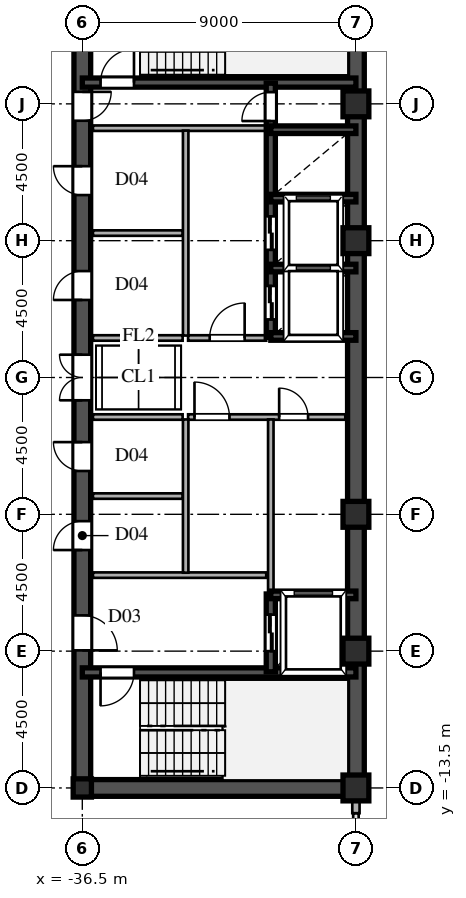
"""IFC4 building model, lengths in metres.
Left out: names, types, materials, properties, quantities, classifications, styles, units other than length and angle.
Written with IfcOpenShell. Run it as: python <this file> out.ifc"""

import sys

from ifc_helpers import new_model, si_unit, direction, frame, frame_2d, origin, origin_2d, place, context, subcontext, project, spatial, rectangle, hollow_rectangle, i_section, extrude, source, transform, mapped, element, fill, save


model = new_model("IFC4")
c1 = context("Model", 3, precision=1e-05, world=origin(), true_north=direction((0.0, 1.0)))
c2 = subcontext(c1, "Body", "Model", "MODEL_VIEW")
j1 = project(units=[si_unit("LENGTHUNIT", "METRE"), si_unit("PLANEANGLEUNIT", "RADIAN")], contexts=[c1])
p1 = place(None, origin())
s1 = spatial("IfcSite", under=j1, at=p1, CompositionType="ELEMENT")
p2 = place(p1, origin())
s2 = spatial("IfcBuilding", under=s1, at=p2, CompositionType="ELEMENT")
p3 = place(p2, frame((0.0, 0.0, 177.9)))
s3 = spatial("IfcBuildingStorey", under=s2, at=p3, CompositionType="ELEMENT", Elevation=177.9)
m1 = source(origin(), c2, "Body", "SweptSolid", [
    extrude(hollow_rectangle(XDim=0.85, YDim=0.85, WallThickness=0.036, at=origin_2d()), origin(), (0.0, 0.0, 1.0), 3.6),
])
for number, where, z_axis, x_axis in (
    (1, (-27.5, -13.5, 0.0), (0.0, 0.0, 1.0), (1.0, 0.0, 0.0)),
    (2, (-27.5, -9.0, 0.0), (0.0, 0.0, 1.0), (1.0, 0.0, 0.0)),
    (3, (-27.5, -4.5, 0.0), (0.0, 0.0, 1.0), (1.0, 0.0, 0.0)),
    (4, (-27.5, 4.5, 0.0), (0.0, 0.0, 1.0), (1.0, 0.0, 0.0)),
    (5, (-27.5, 9.0, 0.0), (0.0, 0.0, 1.0), (1.0, 0.0, 0.0)),
):
    element("IfcColumn", number, at=place(p3, frame(where, z_axis=z_axis, x_axis=x_axis)), inside=s3, PredefinedType="COLUMN", context=c2, shape_type="MappedRepresentation", body=[
        mapped(m1, transform((0.0, 0.0, 0.0), scale=1.0)),
    ])
m2 = source(origin(), c2, "Body", "SweptSolid", [
    extrude(i_section(OverallWidth=0.6, OverallDepth=0.6, WebThickness=0.025, FlangeThickness=0.04, at=origin_2d()), origin(), (0.0, 0.0, 1.0), 3.6),
])
p4 = place(p3, frame((-36.5, -13.5, 0.0), z_axis=(0.0, 0.0, 1.0), x_axis=(1.0, 0.0, 0.0)))
e6 = element("IfcColumn", 6, at=p4, inside=s3, PredefinedType="COLUMN", context=c2, shape_type="MappedRepresentation", body=[
    mapped(m2, transform((0.0, 0.0, 0.0), scale=1.0)),
])
p5 = place(p3, frame((-27.5, -14.33, 0.0), z_axis=(0.0, 0.0, 1.0), x_axis=(0.0, 1.0, 0.0)))
e7 = element("IfcWall", 7, at=p5, inside=s3, PredefinedType="SOLIDWALL", context=c2, shape_type="SweptSolid", body=[
    extrude(rectangle(XDim=0.55, YDim=0.24, at=frame_2d((0.275, 0.0))), origin(), (0.0, 0.0, 1.0), 2.88),
])
for number, where, z_axis, x_axis in (
    (8, (-27.5, -13.5, 0.0), (0.0, 0.0, 1.0), (0.0, 1.0, 0.0)),
    (9, (-27.5, 1.3, 0.0), (0.0, 0.0, 1.0), (0.0, 1.0, 0.0)),
):
    element("IfcWall", number, at=place(p3, frame(where, z_axis=z_axis, x_axis=x_axis)), inside=s3, PredefinedType="SHEAR", context=c2, shape_type="SweptSolid", body=[
        extrude(rectangle(XDim=12.2, YDim=0.55, at=frame_2d((6.1, 0.0))), origin(), (0.0, 0.0, 1.0), 3.38),
    ])
p6 = place(p3, frame((-27.5, -1.3, 0.0), z_axis=(0.0, 0.0, 1.0), x_axis=(0.0, 1.0, 0.0)))
e10 = element("IfcWall", 10, at=p6, inside=s3, PredefinedType="SHEAR", context=c2, shape_type="SweptSolid", body=[
    extrude(rectangle(XDim=2.6, YDim=0.55, at=frame_2d((1.3, 0.0))), origin(), (0.0, 0.0, 1.0), 3.38),
])
p7 = place(p3, frame((-36.5, -13.5, 0.0), z_axis=(0.0, 0.0, 1.0), x_axis=(1.0, 0.0, 0.0)))
e11 = element("IfcWall", 11, at=p7, inside=s3, PredefinedType="SHEAR", context=c2, shape_type="SweptSolid", body=[
    extrude(rectangle(XDim=9.0, YDim=0.55, at=frame_2d((4.5, 0.0))), origin(), (0.0, 0.0, 1.0), 3.38),
])
p8 = place(p3, frame((-36.5, -13.65, 0.0), z_axis=(0.0, 0.0, 1.0), x_axis=(0.0, 1.0, 0.0)))
e12 = element("IfcWall", 12, at=p8, inside=s3, PredefinedType="SHEAR", context=c2, shape_type="SweptSolid", body=[
    extrude(rectangle(XDim=7.15, YDim=0.55, at=frame_2d((3.575, 0.0))), origin(), (0.0, 0.0, 1.0), 3.38),
])
p9 = place(p8, frame((4.675, 0.0, 0.0)))
e13 = element("IfcOpeningElement", 13, at=p9, cuts=e12, PredefinedType="OPENING", context=c2, shape_type="SweptSolid", body=[
    extrude(rectangle(XDim=1.15, YDim=2.2, at=frame_2d((0.575, 1.1))), frame((0.0, 0.285, 0.0), z_axis=(0.0, -1.0, 0.0), x_axis=(1.0, 0.0, 0.0)), (0.0, 0.0, 1.0), 0.57),
])
p10 = place(p3, frame((-36.5, -1.3, 0.0), z_axis=(0.0, 0.0, 1.0), x_axis=(0.0, 1.0, 0.0)))
e14 = element("IfcWall", 14, at=p10, inside=s3, PredefinedType="SHEAR", context=c2, shape_type="SweptSolid", body=[
    extrude(rectangle(XDim=2.6, YDim=0.55, at=frame_2d((1.3, 0.0))), origin(), (0.0, 0.0, 1.0), 3.38),
])
p11 = place(p10, frame((0.55, 0.0, 0.0)))
e15 = element("IfcOpeningElement", 15, at=p11, cuts=e14, PredefinedType="OPENING", context=c2, shape_type="SweptSolid", body=[
    extrude(rectangle(XDim=1.5, YDim=2.3, at=frame_2d((0.75, 1.15))), frame((0.0, 0.285, 0.0), z_axis=(0.0, -1.0, 0.0), x_axis=(1.0, 0.0, 0.0)), (0.0, 0.0, 1.0), 0.57),
])
p12 = place(p3, frame((-36.5, 8.2, 0.0), z_axis=(0.0, 0.0, 1.0), x_axis=(0.0, 1.0, 0.0)))
e16 = element("IfcWall", 16, at=p12, inside=s3, PredefinedType="SHEAR", context=c2, shape_type="SweptSolid", body=[
    extrude(rectangle(XDim=5.45, YDim=0.55, at=frame_2d((2.725, 0.0))), origin(), (0.0, 0.0, 1.0), 3.38),
])
p13 = place(p12, frame((0.245, 0.0, 0.0)))
e17 = element("IfcOpeningElement", 17, at=p13, cuts=e16, PredefinedType="OPENING", context=c2, shape_type="SweptSolid", body=[
    extrude(rectangle(XDim=0.95, YDim=2.15, at=frame_2d((0.475, 1.075))), frame((0.0, 0.285, 0.0), z_axis=(0.0, -1.0, 0.0), x_axis=(1.0, 0.0, 0.0)), (0.0, 0.0, 1.0), 0.57),
])
p14 = place(p3, frame((-36.5, -6.5, 0.0), z_axis=(0.0, 0.0, 1.0), x_axis=(0.0, 1.0, 0.0)))
e18 = element("IfcWall", 18, at=p14, inside=s3, PredefinedType="SHEAR", context=c2, shape_type="SweptSolid", body=[
    extrude(rectangle(XDim=2.6, YDim=0.55, at=frame_2d((1.3, 0.0))), origin(), (0.0, 0.0, 1.0), 3.38),
])
p15 = place(p14, frame((0.825, 0.0, 0.0)))
e19 = element("IfcOpeningElement", 19, at=p15, cuts=e18, PredefinedType="OPENING", context=c2, shape_type="SweptSolid", body=[
    extrude(rectangle(XDim=0.95, YDim=2.15, at=frame_2d((0.475, 1.075))), frame((0.0, 0.285, 0.0), z_axis=(0.0, -1.0, 0.0), x_axis=(1.0, 0.0, 0.0)), (0.0, 0.0, 1.0), 0.57),
])
p16 = place(p3, frame((-36.5, -3.9, 0.0), z_axis=(0.0, 0.0, 1.0), x_axis=(0.0, 1.0, 0.0)))
e20 = element("IfcWall", 20, at=p16, inside=s3, PredefinedType="SHEAR", context=c2, shape_type="SweptSolid", body=[
    extrude(rectangle(XDim=2.6, YDim=0.55, at=frame_2d((1.3, 0.0))), origin(), (0.0, 0.0, 1.0), 3.38),
])
p17 = place(p16, frame((0.825, 0.0, 0.0)))
e21 = element("IfcOpeningElement", 21, at=p17, cuts=e20, PredefinedType="OPENING", context=c2, shape_type="SweptSolid", body=[
    extrude(rectangle(XDim=0.95, YDim=2.15, at=frame_2d((0.475, 1.075))), frame((0.0, 0.285, 0.0), z_axis=(0.0, -1.0, 0.0), x_axis=(1.0, 0.0, 0.0)), (0.0, 0.0, 1.0), 0.57),
])
p18 = place(p3, frame((-36.5, 1.3, 0.0), z_axis=(0.0, 0.0, 1.0), x_axis=(0.0, 1.0, 0.0)))
e22 = element("IfcWall", 22, at=p18, inside=s3, PredefinedType="SHEAR", context=c2, shape_type="SweptSolid", body=[
    extrude(rectangle(XDim=3.45, YDim=0.55, at=frame_2d((1.725, 0.0))), origin(), (0.0, 0.0, 1.0), 3.38),
])
p19 = place(p18, frame((1.25, 0.0, 0.0)))
e23 = element("IfcOpeningElement", 23, at=p19, cuts=e22, PredefinedType="OPENING", context=c2, shape_type="SweptSolid", body=[
    extrude(rectangle(XDim=0.95, YDim=2.15, at=frame_2d((0.475, 1.075))), frame((0.0, 0.285, 0.0), z_axis=(0.0, -1.0, 0.0), x_axis=(1.0, 0.0, 0.0)), (0.0, 0.0, 1.0), 0.57),
])
p20 = place(p3, frame((-36.5, 4.75, 0.0), z_axis=(0.0, 0.0, 1.0), x_axis=(0.0, 1.0, 0.0)))
e24 = element("IfcWall", 24, at=p20, inside=s3, PredefinedType="SHEAR", context=c2, shape_type="SweptSolid", body=[
    extrude(rectangle(XDim=3.45, YDim=0.55, at=frame_2d((1.725, 0.0))), origin(), (0.0, 0.0, 1.0), 3.38),
])
p21 = place(p20, frame((1.25, 0.0, 0.0)))
e25 = element("IfcOpeningElement", 25, at=p21, cuts=e24, PredefinedType="OPENING", context=c2, shape_type="SweptSolid", body=[
    extrude(rectangle(XDim=0.95, YDim=2.15, at=frame_2d((0.475, 1.075))), frame((0.0, 0.285, 0.0), z_axis=(0.0, -1.0, 0.0), x_axis=(1.0, 0.0, 0.0)), (0.0, 0.0, 1.0), 0.57),
])
p22 = place(p3, frame((-36.5, -9.7, 0.0), z_axis=(0.0, 0.0, 1.0), x_axis=(1.0, 0.0, 0.0)))
e26 = element("IfcWall", 26, at=p22, inside=s3, PredefinedType="SHEAR", context=c2, shape_type="SweptSolid", body=[
    extrude(rectangle(XDim=9.0, YDim=0.3, at=frame_2d((4.5, 0.0))), origin(), (0.0, 0.0, 1.0), 3.38),
])
p23 = place(p22, frame((0.6, 0.0, 0.0)))
e27 = element("IfcOpeningElement", 27, at=p23, cuts=e26, PredefinedType="OPENING", context=c2, shape_type="SweptSolid", body=[
    extrude(rectangle(XDim=1.1, YDim=2.2, at=frame_2d((0.55, 1.1))), frame((0.0, 0.16, 0.0), z_axis=(0.0, -1.0, 0.0), x_axis=(1.0, 0.0, 0.0)), (0.0, 0.0, 1.0), 0.32),
])
p24 = place(p3, frame((-36.5, 9.7, 0.0), z_axis=(0.0, 0.0, 1.0), x_axis=(1.0, 0.0, 0.0)))
e28 = element("IfcWall", 28, at=p24, inside=s3, PredefinedType="SHEAR", context=c2, shape_type="SweptSolid", body=[
    extrude(rectangle(XDim=9.0, YDim=0.3, at=frame_2d((4.5, 0.0))), origin(), (0.0, 0.0, 1.0), 3.38),
])
p25 = place(p24, frame((0.6, 0.0, 0.0)))
e29 = element("IfcOpeningElement", 29, at=p25, cuts=e28, PredefinedType="OPENING", context=c2, shape_type="SweptSolid", body=[
    extrude(rectangle(XDim=1.1, YDim=2.2, at=frame_2d((0.55, 1.1))), frame((0.0, 0.16, 0.0), z_axis=(0.0, -1.0, 0.0), x_axis=(1.0, 0.0, 0.0)), (0.0, 0.0, 1.0), 0.32),
])
for number, where, z_axis, x_axis in (
    (30, (-30.3, -7.15, 0.0), (0.0, 0.0, 1.0), (1.0, 0.0, 0.0)),
    (31, (-30.3, 1.35, 0.0), (0.0, 0.0, 1.0), (1.0, 0.0, 0.0)),
    (32, (-30.3, 3.6, 0.0), (0.0, 0.0, 1.0), (1.0, 0.0, 0.0)),
    (33, (-30.3, 5.9, 0.0), (0.0, 0.0, 1.0), (1.0, 0.0, 0.0)),
    (34, (-30.3, 8.15, 0.0), (0.0, 0.0, 1.0), (1.0, 0.0, 0.0)),
):
    element("IfcWall", number, at=place(p3, frame(where, z_axis=z_axis, x_axis=x_axis)), inside=s3, PredefinedType="SHEAR", context=c2, shape_type="SweptSolid", body=[
        extrude(rectangle(XDim=2.8, YDim=0.25, at=frame_2d((1.4, 0.0))), origin(), (0.0, 0.0, 1.0), 3.38),
    ])
p26 = place(p3, frame((-30.3, -9.68, 0.0), z_axis=(0.0, 0.0, 1.0), x_axis=(0.0, 1.0, 0.0)))
e35 = element("IfcWall", 35, at=p26, inside=s3, PredefinedType="SHEAR", context=c2, shape_type="SweptSolid", body=[
    extrude(rectangle(XDim=2.56, YDim=0.3, at=frame_2d((1.28, 0.0))), origin(), (0.0, 0.0, 1.0), 3.38),
])
p27 = place(p26, frame((0.68, 0.0, 0.0)))
e36 = element("IfcOpeningElement", 36, at=p27, cuts=e35, PredefinedType="OPENING", context=c2, shape_type="SweptSolid", body=[
    extrude(rectangle(XDim=1.2, YDim=2.25, at=frame_2d((0.6, 1.125))), frame((0.0, 0.16, 0.0), z_axis=(0.0, -1.0, 0.0), x_axis=(1.0, 0.0, 0.0)), (0.0, 0.0, 1.0), 0.32),
])
p28 = place(p3, frame((-30.3, 1.32, 0.0), z_axis=(0.0, 0.0, 1.0), x_axis=(0.0, 1.0, 0.0)))
e37 = element("IfcWall", 37, at=p28, inside=s3, PredefinedType="SHEAR", context=c2, shape_type="SweptSolid", body=[
    extrude(rectangle(XDim=2.28, YDim=0.3, at=frame_2d((1.14, 0.0))), origin(), (0.0, 0.0, 1.0), 3.38),
])
p29 = place(p28, frame((0.59, 0.0, 0.0)))
e38 = element("IfcOpeningElement", 38, at=p29, cuts=e37, PredefinedType="OPENING", context=c2, shape_type="SweptSolid", body=[
    extrude(rectangle(XDim=1.1, YDim=2.2, at=frame_2d((0.55, 1.1))), frame((0.0, 0.16, 0.0), z_axis=(0.0, -1.0, 0.0), x_axis=(1.0, 0.0, 0.0)), (0.0, 0.0, 1.0), 0.32),
])
p30 = place(p3, frame((-30.3, 3.6, 0.0), z_axis=(0.0, 0.0, 1.0), x_axis=(0.0, 1.0, 0.0)))
e39 = element("IfcWall", 39, at=p30, inside=s3, PredefinedType="SHEAR", context=c2, shape_type="SweptSolid", body=[
    extrude(rectangle(XDim=2.3, YDim=0.3, at=frame_2d((1.15, 0.0))), origin(), (0.0, 0.0, 1.0), 3.38),
])
p31 = place(p30, frame((0.6, 0.0, 0.0)))
e40 = element("IfcOpeningElement", 40, at=p31, cuts=e39, PredefinedType="OPENING", context=c2, shape_type="SweptSolid", body=[
    extrude(rectangle(XDim=1.1, YDim=2.2, at=frame_2d((0.55, 1.1))), frame((0.0, 0.16, 0.0), z_axis=(0.0, -1.0, 0.0), x_axis=(1.0, 0.0, 0.0)), (0.0, 0.0, 1.0), 0.32),
])
p32 = place(p3, frame((-30.3, 5.9, 0.0), z_axis=(0.0, 0.0, 1.0), x_axis=(0.0, 1.0, 0.0)))
e41 = element("IfcWall", 41, at=p32, inside=s3, PredefinedType="SHEAR", context=c2, shape_type="SweptSolid", body=[
    extrude(rectangle(XDim=2.25, YDim=0.3, at=frame_2d((1.125, 0.0))), origin(), (0.0, 0.0, 1.0), 3.38),
])
p33 = place(p3, frame((-30.3, 8.15, 0.0), z_axis=(0.0, 0.0, 1.0), x_axis=(0.0, 1.0, 0.0)))
e42 = element("IfcWall", 42, at=p33, inside=s3, PredefinedType="SHEAR", context=c2, shape_type="SweptSolid", body=[
    extrude(rectangle(XDim=1.53, YDim=0.3, at=frame_2d((0.765, 0.0))), origin(), (0.0, 0.0, 1.0), 3.38),
])
p34 = place(p33, frame((0.285, 0.0, 0.0)))
e43 = element("IfcOpeningElement", 43, at=p34, cuts=e42, PredefinedType="OPENING", context=c2, shape_type="SweptSolid", body=[
    extrude(rectangle(XDim=0.95, YDim=2.15, at=frame_2d((0.475, 1.075))), frame((0.0, 0.16, 0.0), z_axis=(0.0, -1.0, 0.0), x_axis=(1.0, 0.0, 0.0)), (0.0, 0.0, 1.0), 0.32),
])
for number, where, z_axis, x_axis in (
    (44, (-36.15, -6.5, 0.0), (0.0, 0.0, 1.0), (1.0, 0.0, 0.0)),
    (45, (-36.15, 8.2, 0.0), (0.0, 0.0, 1.0), (1.0, 0.0, 0.0)),
):
    element("IfcWall", number, at=place(p3, frame(where, z_axis=z_axis, x_axis=x_axis)), inside=s3, PredefinedType="PARTITIONING", context=c2, shape_type="SweptSolid", body=[
        extrude(rectangle(XDim=5.7, YDim=0.18, at=frame_2d((2.85, 0.0))), origin(), (0.0, 0.0, 1.0), 3.38),
    ])
p35 = place(p3, frame((-33.1, -6.42, 0.0), z_axis=(0.0, 0.0, 1.0), x_axis=(0.0, 1.0, 0.0)))
e46 = element("IfcWall", 46, at=p35, inside=s3, PredefinedType="PARTITIONING", context=c2, shape_type="SweptSolid", body=[
    extrude(rectangle(XDim=5.04, YDim=0.18, at=frame_2d((2.52, 0.0))), origin(), (0.0, 0.0, 1.0), 3.38),
])
p36 = place(p3, frame((-33.1, 1.38, 0.0), z_axis=(0.0, 0.0, 1.0), x_axis=(0.0, 1.0, 0.0)))
e47 = element("IfcWall", 47, at=p36, inside=s3, PredefinedType="PARTITIONING", context=c2, shape_type="SweptSolid", body=[
    extrude(rectangle(XDim=6.74, YDim=0.18, at=frame_2d((3.37, 0.0))), origin(), (0.0, 0.0, 1.0), 3.38),
])
p37 = place(p3, frame((-30.3, -1.3, 0.0), z_axis=(0.0, 0.0, 1.0), x_axis=(1.0, 0.0, 0.0)))
e48 = element("IfcWall", 48, at=p37, inside=s3, PredefinedType="PARTITIONING", context=c2, shape_type="SweptSolid", body=[
    extrude(rectangle(XDim=2.45, YDim=0.18, at=frame_2d((1.225, 0.0))), origin(), (0.0, 0.0, 1.0), 3.38),
])
p38 = place(p37, frame((0.275, 0.0, 0.0)))
e49 = element("IfcOpeningElement", 49, at=p38, cuts=e48, PredefinedType="OPENING", context=c2, shape_type="SweptSolid", body=[
    extrude(rectangle(XDim=0.95, YDim=2.15, at=frame_2d((0.475, 1.075))), frame((0.0, 0.1, 0.0), z_axis=(0.0, -1.0, 0.0), x_axis=(1.0, 0.0, 0.0)), (0.0, 0.0, 1.0), 0.2),
])
p39 = place(p3, frame((-33.02, -1.3, 0.0), z_axis=(0.0, 0.0, 1.0), x_axis=(1.0, 0.0, 0.0)))
e50 = element("IfcWall", 50, at=p39, inside=s3, PredefinedType="PARTITIONING", context=c2, shape_type="SweptSolid", body=[
    extrude(rectangle(XDim=2.72, YDim=0.18, at=frame_2d((1.36, 0.0))), origin(), (0.0, 0.0, 1.0), 3.38),
])
p40 = place(p39, frame((0.21, 0.0, 0.0)))
e51 = element("IfcOpeningElement", 51, at=p40, cuts=e50, PredefinedType="OPENING", context=c2, shape_type="SweptSolid", body=[
    extrude(rectangle(XDim=1.15, YDim=2.2, at=frame_2d((0.575, 1.1))), frame((0.0, 0.1, 0.0), z_axis=(0.0, -1.0, 0.0), x_axis=(1.0, 0.0, 0.0)), (0.0, 0.0, 1.0), 0.2),
])
p41 = place(p3, frame((-30.3, -7.12, 0.0), z_axis=(0.0, 0.0, 1.0), x_axis=(0.0, 1.0, 0.0)))
e52 = element("IfcWall", 52, at=p41, inside=s3, PredefinedType="PARTITIONING", context=c2, shape_type="SweptSolid", body=[
    extrude(rectangle(XDim=5.74, YDim=0.18, at=frame_2d((2.87, 0.0))), origin(), (0.0, 0.0, 1.0), 3.38),
])
p42 = place(p3, frame((-33.02, 1.3, 0.0), z_axis=(0.0, 0.0, 1.0), x_axis=(1.0, 0.0, 0.0)))
e53 = element("IfcWall", 53, at=p42, inside=s3, PredefinedType="PARTITIONING", context=c2, shape_type="SweptSolid", body=[
    extrude(rectangle(XDim=2.57, YDim=0.18, at=frame_2d((1.285, 0.0))), origin(), (0.0, 0.0, 1.0), 3.38),
])
p43 = place(p42, frame((0.71, 0.0, 0.0)))
e54 = element("IfcOpeningElement", 54, at=p43, cuts=e53, PredefinedType="OPENING", context=c2, shape_type="SweptSolid", body=[
    extrude(rectangle(XDim=1.15, YDim=2.2, at=frame_2d((0.575, 1.1))), frame((0.0, 0.1, 0.0), z_axis=(0.0, -1.0, 0.0), x_axis=(1.0, 0.0, 0.0)), (0.0, 0.0, 1.0), 0.2),
])
for number, where, z_axis, x_axis in (
    (55, (-36.15, -1.3, 0.0), (0.0, 0.0, 1.0), (1.0, 0.0, 0.0)),
    (56, (-36.15, 1.3, 0.0), (0.0, 0.0, 1.0), (1.0, 0.0, 0.0)),
    (57, (-36.15, -3.9, 0.0), (0.0, 0.0, 1.0), (1.0, 0.0, 0.0)),
    (58, (-36.15, 4.75, 0.0), (0.0, 0.0, 1.0), (1.0, 0.0, 0.0)),
):
    element("IfcWall", number, at=place(p3, frame(where, z_axis=z_axis, x_axis=x_axis)), inside=s3, PredefinedType="PARTITIONING", context=c2, shape_type="SweptSolid", body=[
        extrude(rectangle(XDim=2.95, YDim=0.18, at=frame_2d((1.475, 0.0))), origin(), (0.0, 0.0, 1.0), 3.38),
    ])
m3 = source(origin(), c2, "Body", "SweptSolid", [
    extrude(rectangle(XDim=1.15, YDim=2.2, at=frame_2d((0.575, 1.1))), frame((0.0, 0.025, 0.0), z_axis=(0.0, -1.0, 0.0), x_axis=(1.0, 0.0, 0.0)), (0.0, 0.0, 1.0), 0.05),
])
p44 = place(p9, frame((1.15, 0.0, 0.0), z_axis=(0.0, 0.0, 1.0), x_axis=(-1.0, 0.0, 0.0)))
e59 = element("IfcDoor", 59, at=p44, inside=s3, OperationType="SINGLE_SWING_LEFT", PredefinedType="DOOR", context=c2, shape_type="MappedRepresentation", body=[
    mapped(m3, transform((0.0, 0.0, 0.0), scale=1.0)),
])
fill(e13, e59)
m4 = source(origin(), c2, "Body", "SweptSolid", [
    extrude(rectangle(XDim=1.5, YDim=2.3, at=frame_2d((0.75, 1.15))), frame((0.0, 0.025, 0.0), z_axis=(0.0, -1.0, 0.0), x_axis=(1.0, 0.0, 0.0)), (0.0, 0.0, 1.0), 0.05),
])
p45 = place(p11, origin())
e60 = element("IfcDoor", 60, at=p45, inside=s3, OperationType="DOUBLE_SWING_LEFT", PredefinedType="DOOR", context=c2, shape_type="MappedRepresentation", body=[
    mapped(m4, transform((0.0, 0.0, 0.0), scale=1.0)),
])
fill(e15, e60)
m5 = source(origin(), c2, "Body", "SweptSolid", [
    extrude(rectangle(XDim=0.95, YDim=2.15, at=frame_2d((0.475, 1.075))), frame((0.0, 0.025, 0.0), z_axis=(0.0, -1.0, 0.0), x_axis=(1.0, 0.0, 0.0)), (0.0, 0.0, 1.0), 0.05),
])
p46 = place(p13, frame((0.95, 0.0, 0.0), z_axis=(0.0, 0.0, 1.0), x_axis=(-1.0, 0.0, 0.0)))
e61 = element("IfcDoor", 61, at=p46, inside=s3, OperationType="SINGLE_SWING_RIGHT", PredefinedType="DOOR", context=c2, shape_type="MappedRepresentation", body=[
    mapped(m5, transform((0.0, 0.0, 0.0), scale=1.0)),
])
fill(e17, e61)
p47 = place(p15, origin())
e62 = element("IfcDoor", 62, at=p47, inside=s3, OperationType="SINGLE_SWING_LEFT", PredefinedType="DOOR", context=c2, shape_type="MappedRepresentation", body=[
    mapped(m5, transform((0.0, 0.0, 0.0), scale=1.0)),
])
fill(e19, e62)
p48 = place(p17, origin())
e63 = element("IfcDoor", 63, at=p48, inside=s3, OperationType="SINGLE_SWING_RIGHT", PredefinedType="DOOR", context=c2, shape_type="MappedRepresentation", body=[
    mapped(m5, transform((0.0, 0.0, 0.0), scale=1.0)),
])
fill(e21, e63)
p49 = place(p19, origin())
e64 = element("IfcDoor", 64, at=p49, inside=s3, OperationType="SINGLE_SWING_LEFT", PredefinedType="DOOR", context=c2, shape_type="MappedRepresentation", body=[
    mapped(m5, transform((0.0, 0.0, 0.0), scale=1.0)),
])
fill(e23, e64)
p50 = place(p21, origin())
e65 = element("IfcDoor", 65, at=p50, inside=s3, OperationType="SINGLE_SWING_RIGHT", PredefinedType="DOOR", context=c2, shape_type="MappedRepresentation", body=[
    mapped(m5, transform((0.0, 0.0, 0.0), scale=1.0)),
])
fill(e25, e65)
m6 = source(origin(), c2, "Body", "SweptSolid", [
    extrude(rectangle(XDim=1.1, YDim=2.2, at=frame_2d((0.55, 1.1))), frame((0.0, 0.025, 0.0), z_axis=(0.0, -1.0, 0.0), x_axis=(1.0, 0.0, 0.0)), (0.0, 0.0, 1.0), 0.05),
])
p51 = place(p23, frame((1.1, 0.0, 0.0), z_axis=(0.0, 0.0, 1.0), x_axis=(-1.0, 0.0, 0.0)))
e66 = element("IfcDoor", 66, at=p51, inside=s3, OperationType="SINGLE_SWING_LEFT", PredefinedType="DOOR", context=c2, shape_type="MappedRepresentation", body=[
    mapped(m6, transform((0.0, 0.0, 0.0), scale=1.0)),
])
fill(e27, e66)
p52 = place(p25, origin())
e67 = element("IfcDoor", 67, at=p52, inside=s3, OperationType="SINGLE_SWING_RIGHT", PredefinedType="DOOR", context=c2, shape_type="MappedRepresentation", body=[
    mapped(m6, transform((0.0, 0.0, 0.0), scale=1.0)),
])
fill(e29, e67)
m7 = source(origin(), c2, "Body", "SweptSolid", [
    extrude(rectangle(XDim=1.2, YDim=2.25, at=frame_2d((0.6, 1.125))), frame((0.0, 0.025, 0.0), z_axis=(0.0, -1.0, 0.0), x_axis=(1.0, 0.0, 0.0)), (0.0, 0.0, 1.0), 0.05),
])
p53 = place(p27, origin())
e68 = element("IfcDoor", 68, at=p53, inside=s3, OperationType="DOUBLE_DOOR_SLIDING", PredefinedType="DOOR", context=c2, shape_type="MappedRepresentation", body=[
    mapped(m7, transform((0.0, 0.0, 0.0), scale=1.0)),
])
fill(e36, e68)
m8 = source(origin(), c2, "Body", "SweptSolid", [
    extrude(rectangle(XDim=1.1, YDim=2.2, at=frame_2d((0.55, 1.1))), frame((0.0, 0.025, 0.0), z_axis=(0.0, -1.0, 0.0), x_axis=(1.0, 0.0, 0.0)), (0.0, 0.0, 1.0), 0.05),
])
p54 = place(p29, origin())
e69 = element("IfcDoor", 69, at=p54, inside=s3, OperationType="DOUBLE_DOOR_SLIDING", PredefinedType="DOOR", context=c2, shape_type="MappedRepresentation", body=[
    mapped(m8, transform((0.0, 0.0, 0.0), scale=1.0)),
])
fill(e38, e69)
p55 = place(p31, origin())
e70 = element("IfcDoor", 70, at=p55, inside=s3, OperationType="DOUBLE_DOOR_SLIDING", PredefinedType="DOOR", context=c2, shape_type="MappedRepresentation", body=[
    mapped(m8, transform((0.0, 0.0, 0.0), scale=1.0)),
])
fill(e40, e70)
p56 = place(p34, origin())
e71 = element("IfcDoor", 71, at=p56, inside=s3, OperationType="SINGLE_SWING_LEFT", PredefinedType="DOOR", context=c2, shape_type="MappedRepresentation", body=[
    mapped(m5, transform((0.0, 0.0, 0.0), scale=1.0)),
])
fill(e43, e71)
p57 = place(p38, origin())
e72 = element("IfcDoor", 72, at=p57, inside=s3, OperationType="SINGLE_SWING_LEFT", PredefinedType="DOOR", context=c2, shape_type="MappedRepresentation", body=[
    mapped(m5, transform((0.0, 0.0, 0.0), scale=1.0)),
])
fill(e49, e72)
p58 = place(p40, origin())
e73 = element("IfcDoor", 73, at=p58, inside=s3, OperationType="SINGLE_SWING_LEFT", PredefinedType="DOOR", context=c2, shape_type="MappedRepresentation", body=[
    mapped(m3, transform((0.0, 0.0, 0.0), scale=1.0)),
])
fill(e51, e73)
p59 = place(p43, origin())
e74 = element("IfcDoor", 74, at=p59, inside=s3, OperationType="SINGLE_SWING_RIGHT", PredefinedType="DOOR", context=c2, shape_type="MappedRepresentation", body=[
    mapped(m3, transform((0.0, 0.0, 0.0), scale=1.0)),
])
fill(e54, e74)
save(model, sys.argv[1])
